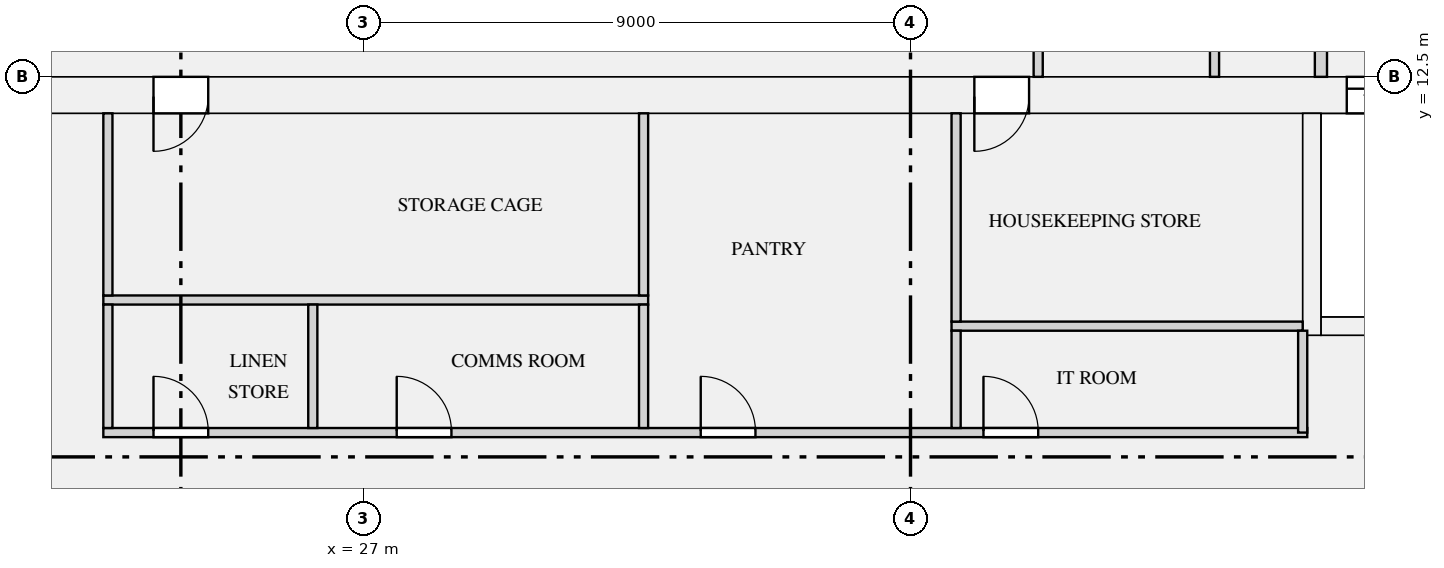
"""IFC4 building model, lengths in metres.
Left out: names, types, materials, properties, quantities, classifications, styles, units other than length and angle.
Written with IfcOpenShell. Run it as: python <this file> out.ifc"""

import sys

from ifc_helpers import new_model, si_unit, direction, frame, frame_2d, origin, place, context, subcontext, project, spatial, rectangle, extrude, element, fill, save


model = new_model("IFC4")
c1 = context("Model", 3, precision=1e-05, world=origin(), true_north=direction((0.0, 1.0)))
c2 = subcontext(c1, "Body", "Model", "MODEL_VIEW")
j1 = project(units=[si_unit("LENGTHUNIT", "METRE"), si_unit("PLANEANGLEUNIT", "RADIAN")], contexts=[c1])
p1 = place(None, origin())
s1 = spatial("IfcSite", under=j1, at=p1, CompositionType="ELEMENT")
p2 = place(p1, origin())
s2 = spatial("IfcBuilding", under=s1, at=p2, CompositionType="ELEMENT")
p3 = place(p2, frame((0.0, 0.0, 93.0)))
s3 = spatial("IfcBuildingStorey", under=s2, at=p3, CompositionType="ELEMENT", Elevation=93.0)
p4 = place(p3, frame((18.8, 12.2, 0.0), z_axis=(0.0, 0.0, 1.0), x_axis=(1.0, 0.0, 0.0)))
e1 = element("IfcWall", 1, at=p4, inside=s3, PredefinedType="SHEAR", context=c2, shape_type="SweptSolid", body=[
    extrude(rectangle(XDim=34.4, YDim=0.6, at=frame_2d((17.2, 0.0))), origin(), (0.0, 0.0, 1.0), 3.15),
])
p5 = place(p4, frame((24.375, 0.0, 0.0)))
e2 = element("IfcOpeningElement", 2, at=p5, cuts=e1, PredefinedType="OPENING", context=c2, shape_type="SweptSolid", body=[
    extrude(rectangle(XDim=1.1, YDim=2.1, at=frame_2d((0.55, 1.05))), frame((0.0, 0.31, 0.0), z_axis=(0.0, -1.0, 0.0), x_axis=(1.0, 0.0, 0.0)), (0.0, 0.0, 1.0), 0.62),
])
p6 = place(p4, frame((26.625, 0.0, 0.0)))
e3 = element("IfcOpeningElement", 3, at=p6, cuts=e1, PredefinedType="OPENING", context=c2, shape_type="SweptSolid", body=[
    extrude(rectangle(XDim=1.1, YDim=2.1, at=frame_2d((0.55, 1.05))), frame((0.0, 0.31, 0.0), z_axis=(0.0, -1.0, 0.0), x_axis=(1.0, 0.0, 0.0)), (0.0, 0.0, 1.0), 0.62),
])
p7 = place(p4, frame((28.875, 0.0, 0.0)))
e4 = element("IfcOpeningElement", 4, at=p7, cuts=e1, PredefinedType="OPENING", context=c2, shape_type="SweptSolid", body=[
    extrude(rectangle(XDim=1.1, YDim=2.1, at=frame_2d((0.55, 1.05))), frame((0.0, 0.31, 0.0), z_axis=(0.0, -1.0, 0.0), x_axis=(1.0, 0.0, 0.0)), (0.0, 0.0, 1.0), 0.62),
])
p8 = place(p4, frame((4.75, 0.0, 0.0)))
e5 = element("IfcOpeningElement", 5, at=p8, cuts=e1, PredefinedType="OPENING", context=c2, shape_type="SweptSolid", body=[
    extrude(rectangle(XDim=0.9, YDim=2.1, at=frame_2d((0.45, 1.05))), frame((0.0, 0.31, 0.0), z_axis=(0.0, -1.0, 0.0), x_axis=(1.0, 0.0, 0.0)), (0.0, 0.0, 1.0), 0.62),
])
p9 = place(p4, frame((18.25, 0.0, 0.0)))
e6 = element("IfcOpeningElement", 6, at=p9, cuts=e1, PredefinedType="OPENING", context=c2, shape_type="SweptSolid", body=[
    extrude(rectangle(XDim=0.9, YDim=2.1, at=frame_2d((0.45, 1.05))), frame((0.0, 0.31, 0.0), z_axis=(0.0, -1.0, 0.0), x_axis=(1.0, 0.0, 0.0)), (0.0, 0.0, 1.0), 0.62),
])
p10 = place(p4, frame((1.35, 0.0, 0.0)))
e7 = element("IfcOpeningElement", 7, at=p10, cuts=e1, PredefinedType="OPENING", context=c2, shape_type="SweptSolid", body=[
    extrude(rectangle(XDim=1.2, YDim=2.1, at=frame_2d((0.6, 1.05))), frame((0.0, 0.31, 0.0), z_axis=(0.0, -1.0, 0.0), x_axis=(1.0, 0.0, 0.0)), (0.0, 0.0, 1.0), 0.62),
])
p11 = place(p4, frame((31.85, 0.0, 0.0)))
e8 = element("IfcOpeningElement", 8, at=p11, cuts=e1, PredefinedType="OPENING", context=c2, shape_type="SweptSolid", body=[
    extrude(rectangle(XDim=1.2, YDim=2.1, at=frame_2d((0.6, 1.05))), frame((0.0, 0.31, 0.0), z_axis=(0.0, -1.0, 0.0), x_axis=(1.0, 0.0, 0.0)), (0.0, 0.0, 1.0), 0.62),
])
p12 = place(p3, frame((42.75, 8.4, 0.0), z_axis=(0.0, 0.0, 1.0), x_axis=(1.0, 0.0, 0.0)))
e9 = element("IfcWall", 9, at=p12, inside=s3, PredefinedType="SHEAR", context=c2, shape_type="SweptSolid", body=[
    extrude(rectangle(XDim=1.95, YDim=0.3, at=frame_2d((0.975, 0.0))), origin(), (0.0, 0.0, 1.0), 3.15),
])
p13 = place(p3, frame((42.6, 8.25, 0.0), z_axis=(0.0, 0.0, 1.0), x_axis=(0.0, 1.0, 0.0)))
e10 = element("IfcWall", 10, at=p13, inside=s3, PredefinedType="SHEAR", context=c2, shape_type="SweptSolid", body=[
    extrude(rectangle(XDim=3.65, YDim=0.3, at=frame_2d((1.825, 0.0))), origin(), (0.0, 0.0, 1.0), 3.15),
])
p14 = place(p3, frame((22.725, 6.65, 0.0), z_axis=(0.0, 0.0, 1.0), x_axis=(1.0, 0.0, 0.0)))
e11 = element("IfcWall", 11, at=p14, inside=s3, PredefinedType="PARTITIONING", context=c2, shape_type="SweptSolid", body=[
    extrude(rectangle(XDim=19.8, YDim=0.15, at=frame_2d((9.9, 0.0))), origin(), (0.0, 0.0, 1.0), 2.83),
])
p15 = place(p14, frame((0.825, 0.0, 0.0)))
e12 = element("IfcOpeningElement", 12, at=p15, cuts=e11, PredefinedType="OPENING", context=c2, shape_type="SweptSolid", body=[
    extrude(rectangle(XDim=0.9, YDim=2.1, at=frame_2d((0.45, 1.05))), frame((0.0, 0.085, 0.0), z_axis=(0.0, -1.0, 0.0), x_axis=(1.0, 0.0, 0.0)), (0.0, 0.0, 1.0), 0.17),
])
p16 = place(p14, frame((4.825, 0.0, 0.0)))
e13 = element("IfcOpeningElement", 13, at=p16, cuts=e11, PredefinedType="OPENING", context=c2, shape_type="SweptSolid", body=[
    extrude(rectangle(XDim=0.9, YDim=2.1, at=frame_2d((0.45, 1.05))), frame((0.0, 0.085, 0.0), z_axis=(0.0, -1.0, 0.0), x_axis=(1.0, 0.0, 0.0)), (0.0, 0.0, 1.0), 0.17),
])
p17 = place(p14, frame((9.825, 0.0, 0.0)))
e14 = element("IfcOpeningElement", 14, at=p17, cuts=e11, PredefinedType="OPENING", context=c2, shape_type="SweptSolid", body=[
    extrude(rectangle(XDim=0.9, YDim=2.1, at=frame_2d((0.45, 1.05))), frame((0.0, 0.085, 0.0), z_axis=(0.0, -1.0, 0.0), x_axis=(1.0, 0.0, 0.0)), (0.0, 0.0, 1.0), 0.17),
])
p18 = place(p14, frame((14.475, 0.0, 0.0)))
e15 = element("IfcOpeningElement", 15, at=p18, cuts=e11, PredefinedType="OPENING", context=c2, shape_type="SweptSolid", body=[
    extrude(rectangle(XDim=0.9, YDim=2.1, at=frame_2d((0.45, 1.05))), frame((0.0, 0.085, 0.0), z_axis=(0.0, -1.0, 0.0), x_axis=(1.0, 0.0, 0.0)), (0.0, 0.0, 1.0), 0.17),
])
p19 = place(p3, frame((36.675, 8.4, 0.0), z_axis=(0.0, 0.0, 1.0), x_axis=(1.0, 0.0, 0.0)))
e16 = element("IfcWall", 16, at=p19, inside=s3, PredefinedType="PARTITIONING", context=c2, shape_type="SweptSolid", body=[
    extrude(rectangle(XDim=5.775, YDim=0.15, at=frame_2d((2.887, 0.0))), origin(), (0.0, 0.0, 1.0), 2.83),
])
p20 = place(p3, frame((22.725, 8.83, 0.0), z_axis=(0.0, 0.0, 1.0), x_axis=(1.0, 0.0, 0.0)))
e17 = element("IfcWall", 17, at=p20, inside=s3, PredefinedType="PARTITIONING", context=c2, shape_type="SweptSolid", body=[
    extrude(rectangle(XDim=8.96, YDim=0.15, at=frame_2d((4.48, 0.0))), origin(), (0.0, 0.0, 1.0), 2.83),
])
p21 = place(p3, frame((42.45, 6.65, 0.0), z_axis=(0.0, 0.0, 1.0), x_axis=(0.0, 1.0, 0.0)))
e18 = element("IfcWall", 18, at=p21, inside=s3, PredefinedType="PARTITIONING", context=c2, shape_type="SweptSolid", body=[
    extrude(rectangle(XDim=1.675, YDim=0.15, at=frame_2d((0.837, 0.0))), origin(), (0.0, 0.0, 1.0), 2.83),
])
for number, where, z_axis, x_axis in (
    (19, (22.8, 6.725, 0.0), (0.0, 0.0, 1.0), (0.0, 1.0, 0.0)),
    (20, (26.17, 6.725, 0.0), (0.0, 0.0, 1.0), (0.0, 1.0, 0.0)),
    (21, (31.61, 6.725, 0.0), (0.0, 0.0, 1.0), (0.0, 1.0, 0.0)),
):
    element("IfcWall", number, at=place(p3, frame(where, z_axis=z_axis, x_axis=x_axis)), inside=s3, PredefinedType="PARTITIONING", context=c2, shape_type="SweptSolid", body=[
        extrude(rectangle(XDim=2.03, YDim=0.15, at=frame_2d((1.015, 0.0))), origin(), (0.0, 0.0, 1.0), 2.83),
    ])
p22 = place(p3, frame((36.75, 6.725, 0.0), z_axis=(0.0, 0.0, 1.0), x_axis=(0.0, 1.0, 0.0)))
e22 = element("IfcWall", 22, at=p22, inside=s3, PredefinedType="PARTITIONING", context=c2, shape_type="SweptSolid", body=[
    extrude(rectangle(XDim=1.6, YDim=0.15, at=frame_2d((0.8, 0.0))), origin(), (0.0, 0.0, 1.0), 2.83),
])
p23 = place(p3, frame((36.75, 8.475, 0.0), z_axis=(0.0, 0.0, 1.0), x_axis=(0.0, 1.0, 0.0)))
e23 = element("IfcWall", 23, at=p23, inside=s3, PredefinedType="PARTITIONING", context=c2, shape_type="SweptSolid", body=[
    extrude(rectangle(XDim=3.425, YDim=0.15, at=frame_2d((1.712, 0.0))), origin(), (0.0, 0.0, 1.0), 2.83),
])
for number, where, z_axis, x_axis in (
    (24, (22.8, 8.905, 0.0), (0.0, 0.0, 1.0), (0.0, 1.0, 0.0)),
    (25, (31.61, 8.905, 0.0), (0.0, 0.0, 1.0), (0.0, 1.0, 0.0)),
):
    element("IfcWall", number, at=place(p3, frame(where, z_axis=z_axis, x_axis=x_axis)), inside=s3, PredefinedType="PARTITIONING", context=c2, shape_type="SweptSolid", body=[
        extrude(rectangle(XDim=2.995, YDim=0.15, at=frame_2d((1.498, 0.0))), origin(), (0.0, 0.0, 1.0), 2.83),
    ])
for number, where, z_axis, x_axis in (
    (26, (38.1, 12.5, 0.0), (0.0, 0.0, 1.0), (0.0, 1.0, 0.0)),
    (27, (41.0, 12.5, 0.0), (0.0, 0.0, 1.0), (0.0, 1.0, 0.0)),
):
    element("IfcWall", number, at=place(p3, frame(where, z_axis=z_axis, x_axis=x_axis)), inside=s3, PredefinedType="PARTITIONING", context=c2, shape_type="SweptSolid", body=[
        extrude(rectangle(XDim=1.925, YDim=0.15, at=frame_2d((0.962, 0.0))), origin(), (0.0, 0.0, 1.0), 2.83),
    ])
p24 = place(p3, frame((42.75, 12.5, 0.0), z_axis=(0.0, 0.0, 1.0), x_axis=(0.0, 1.0, 0.0)))
e28 = element("IfcWall", 28, at=p24, inside=s3, PredefinedType="PARTITIONING", context=c2, shape_type="SweptSolid", body=[
    extrude(rectangle(XDim=3.4, YDim=0.2, at=frame_2d((1.7, 0.0))), origin(), (0.0, 0.0, 1.0), 2.83),
])
p25 = place(p24, frame((2.2, 0.0, 0.0)))
e29 = element("IfcOpeningElement", 29, at=p25, cuts=e28, PredefinedType="OPENING", context=c2, shape_type="SweptSolid", body=[
    extrude(rectangle(XDim=1.0, YDim=2.1, at=frame_2d((0.5, 1.05))), frame((0.0, 0.11, 0.0), z_axis=(0.0, -1.0, 0.0), x_axis=(1.0, 0.0, 0.0)), (0.0, 0.0, 1.0), 0.22),
])
p26 = place(p5, origin())
e30 = element("IfcDoor", 30, at=p26, inside=s3, OperationType="DOUBLE_DOOR_SLIDING", PredefinedType="DOOR", context=c2, shape_type="SweptSolid", body=[
    extrude(rectangle(XDim=1.1, YDim=2.1, at=frame_2d((0.55, 1.05))), frame((0.0, 0.025, 0.0), z_axis=(0.0, -1.0, 0.0), x_axis=(1.0, 0.0, 0.0)), (0.0, 0.0, 1.0), 0.05),
])
fill(e2, e30)
p27 = place(p15, origin())
e31 = element("IfcDoor", 31, at=p27, inside=s3, OperationType="SINGLE_SWING_LEFT", PredefinedType="DOOR", context=c2, shape_type="SweptSolid", body=[
    extrude(rectangle(XDim=0.9, YDim=2.1, at=frame_2d((0.45, 1.05))), frame((0.0, 0.025, 0.0), z_axis=(0.0, -1.0, 0.0), x_axis=(1.0, 0.0, 0.0)), (0.0, 0.0, 1.0), 0.05),
])
fill(e12, e31)
p28 = place(p16, origin())
e32 = element("IfcDoor", 32, at=p28, inside=s3, OperationType="SINGLE_SWING_LEFT", PredefinedType="DOOR", context=c2, shape_type="SweptSolid", body=[
    extrude(rectangle(XDim=0.9, YDim=2.1, at=frame_2d((0.45, 1.05))), frame((0.0, 0.025, 0.0), z_axis=(0.0, -1.0, 0.0), x_axis=(1.0, 0.0, 0.0)), (0.0, 0.0, 1.0), 0.05),
])
fill(e13, e32)
p29 = place(p17, origin())
e33 = element("IfcDoor", 33, at=p29, inside=s3, OperationType="SINGLE_SWING_LEFT", PredefinedType="DOOR", context=c2, shape_type="SweptSolid", body=[
    extrude(rectangle(XDim=0.9, YDim=2.1, at=frame_2d((0.45, 1.05))), frame((0.0, 0.025, 0.0), z_axis=(0.0, -1.0, 0.0), x_axis=(1.0, 0.0, 0.0)), (0.0, 0.0, 1.0), 0.05),
])
fill(e14, e33)
p30 = place(p8, frame((0.9, 0.0, 0.0), z_axis=(0.0, 0.0, 1.0), x_axis=(-1.0, 0.0, 0.0)))
e34 = element("IfcDoor", 34, at=p30, inside=s3, OperationType="SINGLE_SWING_RIGHT", PredefinedType="DOOR", context=c2, shape_type="SweptSolid", body=[
    extrude(rectangle(XDim=0.9, YDim=2.1, at=frame_2d((0.45, 1.05))), frame((0.0, 0.025, 0.0), z_axis=(0.0, -1.0, 0.0), x_axis=(1.0, 0.0, 0.0)), (0.0, 0.0, 1.0), 0.05),
])
fill(e5, e34)
p31 = place(p18, origin())
e35 = element("IfcDoor", 35, at=p31, inside=s3, OperationType="SINGLE_SWING_LEFT", PredefinedType="DOOR", context=c2, shape_type="SweptSolid", body=[
    extrude(rectangle(XDim=0.9, YDim=2.1, at=frame_2d((0.45, 1.05))), frame((0.0, 0.025, 0.0), z_axis=(0.0, -1.0, 0.0), x_axis=(1.0, 0.0, 0.0)), (0.0, 0.0, 1.0), 0.05),
])
fill(e15, e35)
p32 = place(p9, frame((0.9, 0.0, 0.0), z_axis=(0.0, 0.0, 1.0), x_axis=(-1.0, 0.0, 0.0)))
e36 = element("IfcDoor", 36, at=p32, inside=s3, OperationType="SINGLE_SWING_RIGHT", PredefinedType="DOOR", context=c2, shape_type="SweptSolid", body=[
    extrude(rectangle(XDim=0.9, YDim=2.1, at=frame_2d((0.45, 1.05))), frame((0.0, 0.025, 0.0), z_axis=(0.0, -1.0, 0.0), x_axis=(1.0, 0.0, 0.0)), (0.0, 0.0, 1.0), 0.05),
])
fill(e6, e36)
save(model, sys.argv[1])
